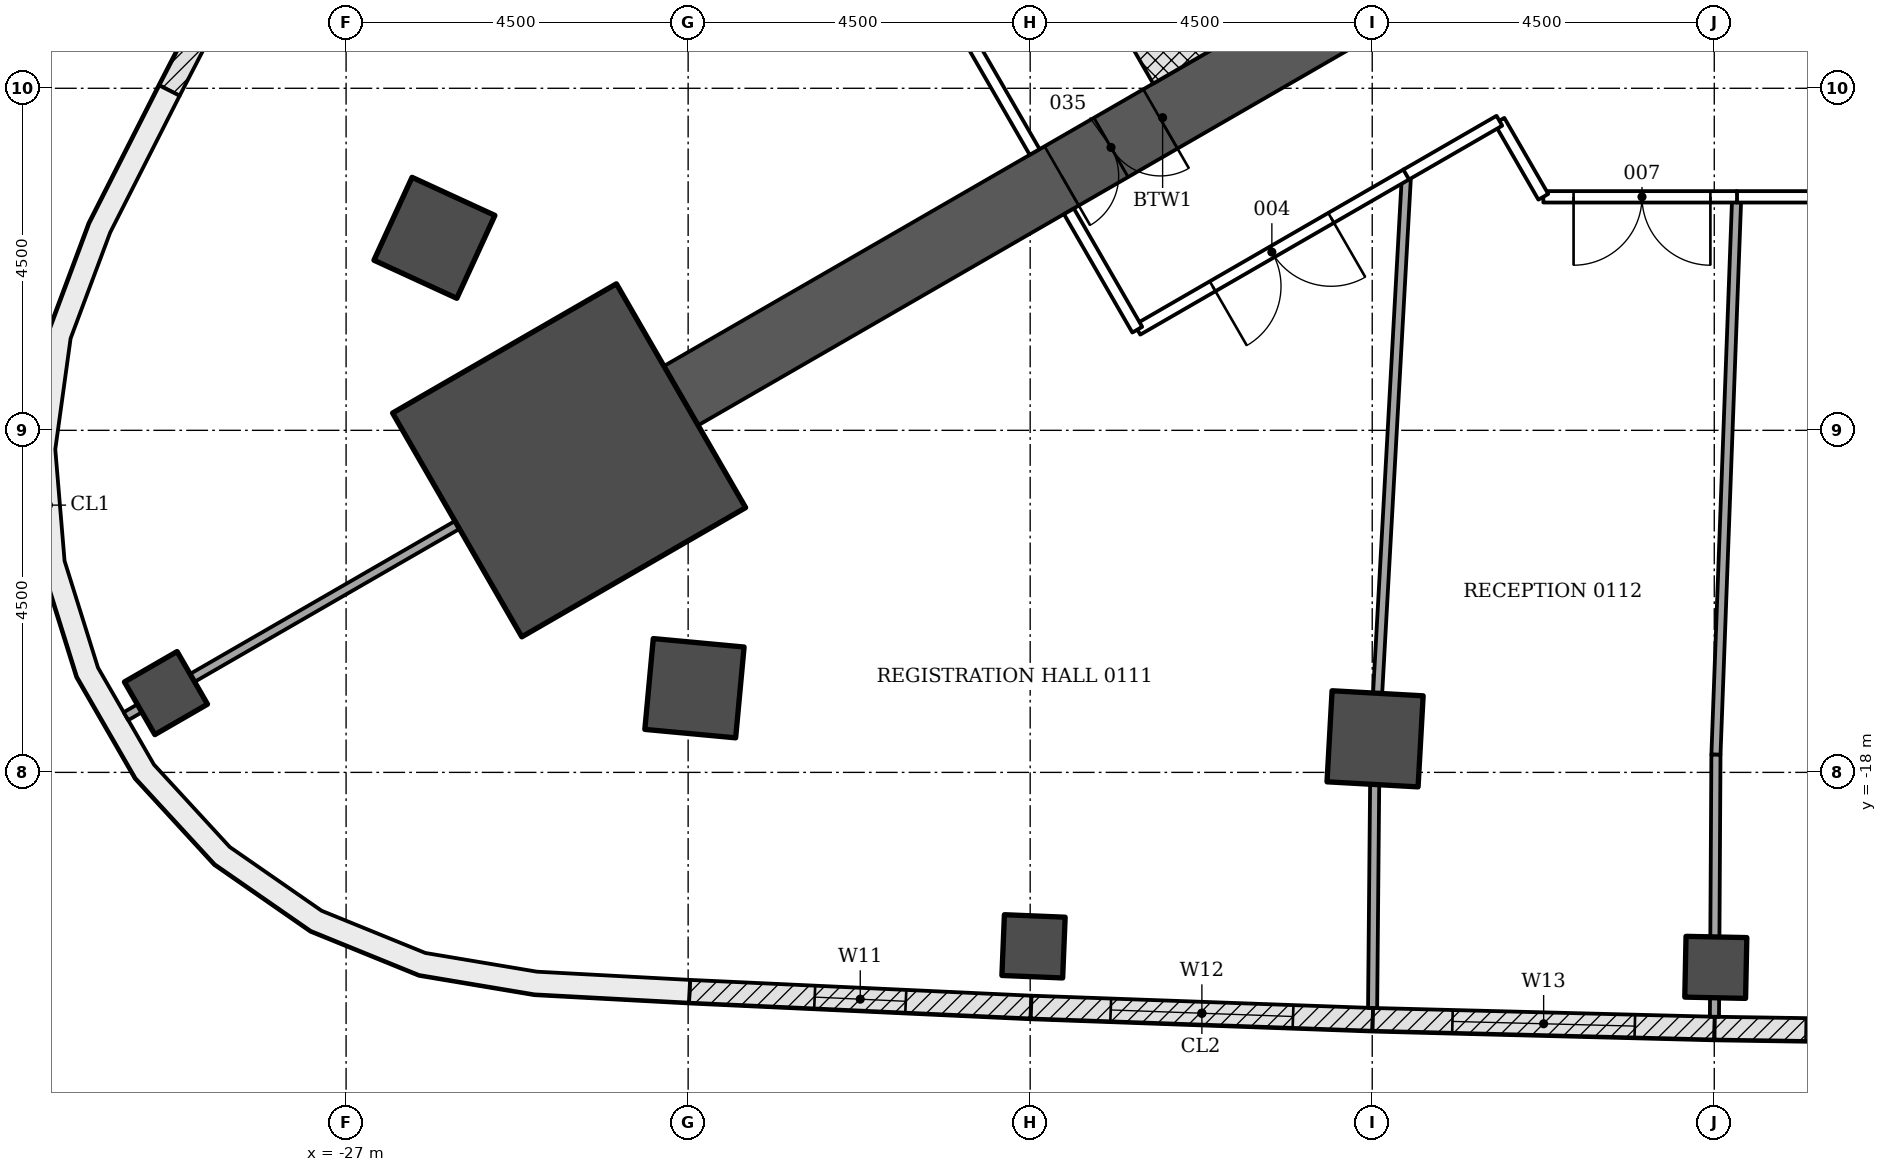
"""IFC4 building model, lengths in metres.
Left out: names, types, materials, properties, quantities, classifications, styles, units other than length and angle.
Written with IfcOpenShell. Run it as: python <this file> out.ifc"""

import sys

from ifc_helpers import new_model, si_unit, direction, frame, frame_2d, origin, origin_2d, place, context, subcontext, project, spatial, polyline, rectangle, outline, extrude, element, fill, save


model = new_model("IFC4")
c1 = context("Model", 3, precision=1e-05, world=origin(), true_north=direction((0.0, 1.0)))
c2 = subcontext(c1, "Body", "Model", "MODEL_VIEW")
j1 = project(units=[si_unit("LENGTHUNIT", "METRE"), si_unit("PLANEANGLEUNIT", "RADIAN")], contexts=[c1])
p1 = place(None, origin())
s1 = spatial("IfcSite", under=j1, at=p1, CompositionType="ELEMENT")
p2 = place(p1, origin())
s2 = spatial("IfcBuilding", under=s1, at=p2, CompositionType="ELEMENT")
p3 = place(p2, frame((0.0, 0.0, 6.0)))
s3 = spatial("IfcBuildingStorey", under=s2, at=p3, CompositionType="ELEMENT", Elevation=6.0)
for number, where, z_axis, x_axis in (
    (1, (-25.838, -10.967, -0.25), (0.0, 0.0, 1.0), (-0.909, 0.418, 0.0)),
    (2, (-22.417, -16.893, -0.25), (0.0, 0.0, 1.0), (-0.093, -0.996, 0.0)),
    (3, (-13.462, -17.558, -0.25), (0.0, 0.0, 1.0), (-0.056, -0.998, 0.0)),
):
    element("IfcColumn", number, at=place(p3, frame(where, z_axis=z_axis, x_axis=x_axis)), inside=s3, PredefinedType="COLUMN", context=c2, shape_type="SweptSolid", body=[
        extrude(rectangle(XDim=1.2, YDim=1.2, at=origin_2d()), origin(), (0.0, 0.0, 1.0), 4.5),
    ])
for number, where, z_axis, x_axis in (
    (4, (-29.37, -16.957, -0.25), (0.0, 0.0, 1.0), (-0.866, -0.5, 0.0)),
    (5, (-17.956, -20.288, -0.25), (0.0, 0.0, 1.0), (-0.041, -0.999, 0.0)),
    (6, (-8.98, -20.565, -0.25), (0.0, 0.0, 1.0), (-0.021, -1.0, 0.0)),
):
    element("IfcColumn", number, at=place(p3, frame(where, z_axis=z_axis, x_axis=x_axis)), inside=s3, PredefinedType="COLUMN", context=c2, shape_type="SweptSolid", body=[
        extrude(rectangle(XDim=0.8, YDim=0.8, at=origin_2d()), origin(), (0.0, 0.0, 1.0), 4.5),
    ])
p4 = place(p3, frame((-9.922, -5.728, -0.25), z_axis=(0.0, 0.0, 1.0), x_axis=(-0.866028046028, -0.499995423472, 0.0)))
e7 = element("IfcWall", 7, at=p4, inside=s3, PredefinedType="SHEAR", context=c2, shape_type="SweptSolid", body=[
    extrude(rectangle(XDim=14.633, YDim=0.9, at=frame_2d((7.316, 0.0))), origin(), (0.0, 0.0, 1.0), 4.5),
])
p5 = place(p4, frame((7.35, 0.0, 0.25)))
e8 = element("IfcOpeningElement", 8, at=p5, cuts=e7, PredefinedType="OPENING", context=c2, shape_type="SweptSolid", body=[
    extrude(rectangle(XDim=1.5, YDim=2.1, at=frame_2d((0.75, 1.05))), frame((0.0, 0.46, 0.0), z_axis=(0.0, -1.0, 0.0), x_axis=(1.0, 0.0, 0.0)), (0.0, 0.0, 1.0), 0.92),
])
p6 = place(p3, frame((-24.066, -13.895, -0.25), z_axis=(0.0, 0.0, 1.0), x_axis=(-0.866025403784, -0.5, 0.0)))
e9 = element("IfcColumn", 9, at=p6, inside=s3, PredefinedType="COLUMN", context=c2, shape_type="SweptSolid", body=[
    extrude(rectangle(XDim=3.4, YDim=3.4, at=origin_2d()), origin(), (0.0, 0.0, 1.0), 4.5),
])
p7 = place(p3, frame((-29.323, -9.029, 0.0), z_axis=(0.0, 0.0, 1.0), x_axis=(0.459443600121, 0.888206945654, 0.0)))
e10 = element("IfcWall", 10, at=p7, inside=s3, PredefinedType="NOTDEFINED", context=c2, shape_type="SweptSolid", body=[
    extrude(rectangle(XDim=4.496, YDim=0.3, at=frame_2d((2.248, 0.0))), origin(), (0.0, 0.0, 1.0), 4.25),
])
p8 = place(p7, frame((1.648, 0.0, 0.8)))
e11 = element("IfcOpeningElement", 11, at=p8, cuts=e10, PredefinedType="OPENING", context=c2, shape_type="SweptSolid", body=[
    extrude(rectangle(XDim=1.2, YDim=3.0, at=frame_2d((0.6, 1.5))), frame((0.0, 0.16, 0.0), z_axis=(0.0, -1.0, 0.0), x_axis=(1.0, 0.0, 0.0)), (0.0, 0.0, 1.0), 0.32),
])
p9 = place(p3, frame((-17.99, -21.088, 0.0), z_axis=(0.0, 0.0, 1.0), x_axis=(-0.998931717866, 0.046210637742, 0.0)))
e12 = element("IfcWall", 12, at=p9, inside=s3, PredefinedType="NOTDEFINED", context=c2, shape_type="SweptSolid", body=[
    extrude(rectangle(XDim=4.496, YDim=0.3, at=frame_2d((2.248, 0.0))), origin(), (0.0, 0.0, 1.0), 4.25),
])
p10 = place(p9, frame((1.648, 0.0, 0.8)))
e13 = element("IfcOpeningElement", 13, at=p10, cuts=e12, PredefinedType="OPENING", context=c2, shape_type="SweptSolid", body=[
    extrude(rectangle(XDim=1.2, YDim=3.0, at=frame_2d((0.6, 1.5))), frame((0.0, 0.16, 0.0), z_axis=(0.0, -1.0, 0.0), x_axis=(1.0, 0.0, 0.0)), (0.0, 0.0, 1.0), 0.32),
])
p11 = place(p3, frame((-13.494, -21.249, 0.0), z_axis=(0.0, 0.0, 1.0), x_axis=(-0.999355640029, 0.035892962294, 0.0)))
e14 = element("IfcWall", 14, at=p11, inside=s3, PredefinedType="NOTDEFINED", context=c2, shape_type="SweptSolid", body=[
    extrude(rectangle(XDim=4.496, YDim=0.3, at=frame_2d((2.248, 0.0))), origin(), (0.0, 0.0, 1.0), 4.25),
])
p12 = place(p11, frame((1.048, 0.0, 0.9)))
e15 = element("IfcOpeningElement", 15, at=p12, cuts=e14, PredefinedType="OPENING", context=c2, shape_type="SweptSolid", body=[
    extrude(rectangle(XDim=2.4, YDim=2.4, at=frame_2d((1.2, 1.2))), frame((0.0, 0.16, 0.0), z_axis=(0.0, -1.0, 0.0), x_axis=(1.0, 0.0, 0.0)), (0.0, 0.0, 1.0), 0.32),
])
p13 = place(p3, frame((-8.998, -21.365, 0.0), z_axis=(0.0, 0.0, 1.0), x_axis=(-0.999671466587, 0.025631209312, 0.0)))
e16 = element("IfcWall", 16, at=p13, inside=s3, PredefinedType="NOTDEFINED", context=c2, shape_type="SweptSolid", body=[
    extrude(rectangle(XDim=4.496, YDim=0.3, at=frame_2d((2.248, 0.0))), origin(), (0.0, 0.0, 1.0), 4.25),
])
p14 = place(p13, frame((1.048, 0.0, 0.9)))
e17 = element("IfcOpeningElement", 17, at=p14, cuts=e16, PredefinedType="OPENING", context=c2, shape_type="SweptSolid", body=[
    extrude(rectangle(XDim=2.4, YDim=2.4, at=frame_2d((1.2, 1.2))), frame((0.0, 0.16, 0.0), z_axis=(0.0, -1.0, 0.0), x_axis=(1.0, 0.0, 0.0)), (0.0, 0.0, 1.0), 0.32),
])
p15 = place(p3, frame((-4.5, -21.434, 0.0), z_axis=(0.0, 0.0, 1.0), x_axis=(-0.999881921814, 0.015366926462, 0.0)))
e18 = element("IfcWall", 18, at=p15, inside=s3, PredefinedType="NOTDEFINED", context=c2, shape_type="SweptSolid", body=[
    extrude(rectangle(XDim=4.496, YDim=0.3, at=frame_2d((2.248, 0.0))), origin(), (0.0, 0.0, 1.0), 4.25),
])
p16 = place(p15, frame((1.198, 0.0, 0.8)))
e19 = element("IfcOpeningElement", 19, at=p16, cuts=e18, PredefinedType="OPENING", context=c2, shape_type="SweptSolid", body=[
    extrude(rectangle(XDim=2.1, YDim=3.0, at=frame_2d((1.05, 1.5))), frame((0.0, 0.16, 0.0), z_axis=(0.0, -1.0, 0.0), x_axis=(1.0, 0.0, 0.0)), (0.0, 0.0, 1.0), 0.32),
])
p17 = place(p3, origin())
e20 = element("IfcWall", 20, at=p17, inside=s3, PredefinedType="NOTDEFINED", context=c2, shape_type="SweptSolid", body=[
    extrude(outline(polyline([(-29.457, -8.962), (-30.379, -10.776), (-30.917, -12.218), (-31.128, -13.742), (-31.0, -15.276), (-30.54, -16.744), (-29.771, -18.077), (-28.729, -19.209), (-27.465, -20.086), (-26.04, -20.666), (-24.522, -20.921), (-22.49, -21.03), (-22.474, -20.73), (-24.489, -20.622), (-25.957, -20.376), (-27.321, -19.821), (-28.531, -18.981), (-29.528, -17.898), (-30.264, -16.623), (-30.704, -15.218), (-30.826, -13.75), (-30.625, -12.292), (-30.104, -10.897), (-29.19, -9.098), (-29.457, -8.962)])), origin(), (0.0, 0.0, 1.0), 4.25),
])
p18 = place(p3, frame((-10.43, -4.847, -0.25), z_axis=(0.0, 0.0, 1.0), x_axis=(-0.866018442252, -0.500012057535, 0.0)))
e21 = element("IfcWall", 21, at=p18, inside=s3, PredefinedType="SHEAR", context=c2, shape_type="SweptSolid", body=[
    extrude(rectangle(XDim=7.2, YDim=1.136, at=frame_2d((3.6, 0.0))), origin(), (0.0, 0.0, 1.0), 4.5),
])
p19 = place(p3, frame((-13.495, -21.099, 0.0), z_axis=(0.0, 0.0, 1.0), x_axis=(0.009216581037, 0.999957526415, 0.0)))
e22 = element("IfcWall", 22, at=p19, inside=s3, PredefinedType="PARTITIONING", context=c2, shape_type="SweptSolid", body=[
    extrude(rectangle(XDim=2.94, YDim=0.12, at=frame_2d((1.47, 0.0))), origin(), (0.0, 0.0, 1.0), 3.633),
])
p20 = place(p3, frame((-13.429, -16.96, 0.0), z_axis=(0.0, 0.0, 1.0), x_axis=(0.055551088657, 0.998455846069, 0.0)))
e23 = element("IfcWall", 23, at=p20, inside=s3, PredefinedType="PARTITIONING", context=c2, shape_type="SweptSolid", body=[
    extrude(rectangle(XDim=6.838, YDim=0.12, at=frame_2d((3.419, 0.0))), origin(), (0.0, 0.0, 1.0), 3.638),
])
p21 = place(p3, frame((-13.045, -10.13, 0.0), z_axis=(0.0, 0.0, 1.0), x_axis=(-0.866035577775, -0.499982377718, 0.0)))
e24 = element("IfcWall", 24, at=p21, inside=s3, PredefinedType="PARTITIONING", context=c2, shape_type="SweptSolid", body=[
    extrude(rectangle(XDim=4.093, YDim=0.15, at=frame_2d((2.046, 0.0))), origin(), (0.0, 0.0, 1.0), 3.638),
])
p22 = place(p21, frame((1.15, 0.0, 0.0)))
e25 = element("IfcOpeningElement", 25, at=p22, cuts=e24, PredefinedType="OPENING", context=c2, shape_type="SweptSolid", body=[
    extrude(rectangle(XDim=1.8, YDim=2.1, at=frame_2d((0.9, 1.05))), frame((0.0, 0.085, 0.0), z_axis=(0.0, -1.0, 0.0), x_axis=(1.0, 0.0, 0.0)), (0.0, 0.0, 1.0), 0.17),
])
p23 = place(p3, frame((-16.591, -12.176, 0.0), z_axis=(0.0, 0.0, 1.0), x_axis=(-0.499965372359, 0.866045395139, 0.0)))
e26 = element("IfcWall", 26, at=p23, inside=s3, PredefinedType="PARTITIONING", context=c2, shape_type="SweptSolid", body=[
    extrude(rectangle(XDim=1.798, YDim=0.15, at=frame_2d((0.899, 0.0))), origin(), (0.0, 0.0, 1.0), 3.638),
])
p24 = place(p3, frame((-29.716, -17.157, 0.0), z_axis=(0.0, 0.0, 1.0), x_axis=(-0.865774595023, -0.500434162116, 0.0)))
e27 = element("IfcWall", 27, at=p24, inside=s3, PredefinedType="PARTITIONING", context=c2, shape_type="SweptSolid", body=[
    extrude(rectangle(XDim=0.208, YDim=0.12, at=frame_2d((0.104, 0.0))), origin(), (0.0, 0.0, 1.0), 4.25),
])
p25 = place(p3, frame((-25.538, -14.745, 0.0), z_axis=(0.0, 0.0, 1.0), x_axis=(-0.866027971625, -0.499995552344, 0.0)))
e28 = element("IfcWall", 28, at=p25, inside=s3, PredefinedType="PARTITIONING", context=c2, shape_type="SweptSolid", body=[
    extrude(rectangle(XDim=4.024, YDim=0.12, at=frame_2d((2.012, 0.0))), origin(), (0.0, 0.0, 1.0), 3.717),
])
p26 = place(p3, frame((-8.996, -20.965, 0.0), z_axis=(0.0, 0.0, 1.0), x_axis=(-0.007812261592, -0.999969483819, 0.0)))
e29 = element("IfcWall", 29, at=p26, inside=s3, PredefinedType="PARTITIONING", context=c2, shape_type="SweptSolid", body=[
    extrude(rectangle(XDim=0.25, YDim=0.12, at=frame_2d((0.125, 0.0))), origin(), (0.0, 0.0, 1.0), 4.25),
])
p27 = place(p3, frame((-8.705, -10.429, 0.0), z_axis=(0.0, 0.0, 1.0), x_axis=(-0.037170289837, -0.999308945999, 0.0)))
e30 = element("IfcWall", 30, at=p27, inside=s3, PredefinedType="PARTITIONING", context=c2, shape_type="SweptSolid", body=[
    extrude(rectangle(XDim=7.343, YDim=0.12, at=frame_2d((3.672, 0.0))), origin(), (0.0, 0.0, 1.0), 3.638),
])
p28 = place(p3, frame((-8.978, -17.767, 0.0), z_axis=(0.0, 0.0, 1.0), x_axis=(-0.005803200997, -0.999983161287, 0.0)))
e31 = element("IfcWall", 31, at=p28, inside=s3, PredefinedType="PARTITIONING", context=c2, shape_type="SweptSolid", body=[
    extrude(rectangle(XDim=2.398, YDim=0.12, at=frame_2d((1.199, 0.0))), origin(), (0.0, 0.0, 1.0), 3.638),
])
p29 = place(p3, frame((0.004, -10.428, 0.0), z_axis=(0.0, 0.0, 1.0), x_axis=(-1.0, 0.0, 0.0)))
e32 = element("IfcWall", 32, at=p29, inside=s3, PredefinedType="PARTITIONING", context=c2, shape_type="SweptSolid", body=[
    extrude(rectangle(XDim=8.713, YDim=0.15, at=frame_2d((4.356, 0.0))), origin(), (0.0, 0.0, 1.0), 3.638),
])
p30 = place(p29, frame((3.45, 0.0, 0.0)))
e33 = element("IfcOpeningElement", 33, at=p30, cuts=e32, PredefinedType="OPENING", context=c2, shape_type="SweptSolid", body=[
    extrude(rectangle(XDim=1.8, YDim=2.1, at=frame_2d((0.9, 1.05))), frame((0.0, 0.085, 0.0), z_axis=(0.0, -1.0, 0.0), x_axis=(1.0, 0.0, 0.0)), (0.0, 0.0, 1.0), 0.17),
])
p31 = place(p3, frame((-8.701, -10.428, 0.0), z_axis=(0.0, 0.0, 1.0), x_axis=(-1.0, 0.0, 0.0)))
e34 = element("IfcWall", 34, at=p31, inside=s3, PredefinedType="PARTITIONING", context=c2, shape_type="SweptSolid", body=[
    extrude(rectangle(XDim=2.548, YDim=0.15, at=frame_2d((1.274, 0.0))), origin(), (0.0, 0.0, 1.0), 3.638),
])
p32 = place(p31, frame((0.35, 0.0, 0.0)))
e35 = element("IfcOpeningElement", 35, at=p32, cuts=e34, PredefinedType="OPENING", context=c2, shape_type="SweptSolid", body=[
    extrude(rectangle(XDim=1.8, YDim=2.1, at=frame_2d((0.9, 1.05))), frame((0.0, 0.085, 0.0), z_axis=(0.0, -1.0, 0.0), x_axis=(1.0, 0.0, 0.0)), (0.0, 0.0, 1.0), 0.17),
])
p33 = place(p3, frame((-11.249, -10.428, 0.0), z_axis=(0.0, 0.0, 1.0), x_axis=(-0.499978438088, 0.866037852202, 0.0)))
e36 = element("IfcWall", 36, at=p33, inside=s3, PredefinedType="PARTITIONING", context=c2, shape_type="SweptSolid", body=[
    extrude(rectangle(XDim=1.156, YDim=0.15, at=frame_2d((0.578, 0.0))), origin(), (0.0, 0.0, 1.0), 4.25),
])
p34 = place(p3, frame((-11.827, -9.427, 0.0), z_axis=(0.0, 0.0, 1.0), x_axis=(-0.865984561414, -0.500070734389, 0.0)))
e37 = element("IfcWall", 37, at=p34, inside=s3, PredefinedType="PARTITIONING", context=c2, shape_type="SweptSolid", body=[
    extrude(rectangle(XDim=1.416, YDim=0.15, at=frame_2d((0.708, 0.0))), origin(), (0.0, 0.0, 1.0), 3.638),
])
p35 = place(p3, frame((-17.941, -9.838, 0.0), z_axis=(0.0, 0.0, 1.0), x_axis=(-0.500048140185, 0.865997608252, 0.0)))
e38 = element("IfcWall", 38, at=p35, inside=s3, PredefinedType="PARTITIONING", context=c2, shape_type="SweptSolid", body=[
    extrude(rectangle(XDim=6.683, YDim=0.15, at=frame_2d((3.342, 0.0))), origin(), (0.0, 0.0, 1.0), 3.638),
])
p36 = place(p35, frame((2.45, 0.0, 0.0)))
e39 = element("IfcOpeningElement", 39, at=p36, cuts=e38, PredefinedType="OPENING", context=c2, shape_type="SweptSolid", body=[
    extrude(rectangle(XDim=1.8, YDim=2.1, at=frame_2d((0.9, 1.05))), frame((0.0, 0.085, 0.0), z_axis=(0.0, -1.0, 0.0), x_axis=(1.0, 0.0, 0.0)), (0.0, 0.0, 1.0), 0.17),
])
p37 = place(p10, origin())
e40 = element("IfcWindow", 40, at=p37, inside=s3, PartitioningType="SINGLE_PANEL", PredefinedType="WINDOW", context=c2, shape_type="SweptSolid", body=[
    extrude(rectangle(XDim=1.2, YDim=3.0, at=frame_2d((0.6, 1.5))), frame((0.0, 0.03, 0.0), z_axis=(0.0, -1.0, 0.0), x_axis=(1.0, 0.0, 0.0)), (0.0, 0.0, 1.0), 0.06),
])
fill(e13, e40)
p38 = place(p12, origin())
e41 = element("IfcWindow", 41, at=p38, inside=s3, PartitioningType="DOUBLE_PANEL_VERTICAL", PredefinedType="WINDOW", context=c2, shape_type="SweptSolid", body=[
    extrude(rectangle(XDim=2.4, YDim=2.4, at=frame_2d((1.2, 1.2))), frame((0.0, 0.03, 0.0), z_axis=(0.0, -1.0, 0.0), x_axis=(1.0, 0.0, 0.0)), (0.0, 0.0, 1.0), 0.06),
])
fill(e15, e41)
p39 = place(p14, origin())
e42 = element("IfcWindow", 42, at=p39, inside=s3, PartitioningType="DOUBLE_PANEL_VERTICAL", PredefinedType="WINDOW", context=c2, shape_type="SweptSolid", body=[
    extrude(rectangle(XDim=2.4, YDim=2.4, at=frame_2d((1.2, 1.2))), frame((0.0, 0.03, 0.0), z_axis=(0.0, -1.0, 0.0), x_axis=(1.0, 0.0, 0.0)), (0.0, 0.0, 1.0), 0.06),
])
fill(e17, e42)
p40 = place(p16, origin())
e43 = element("IfcWindow", 43, at=p40, inside=s3, PartitioningType="DOUBLE_PANEL_HORIZONTAL", PredefinedType="WINDOW", context=c2, shape_type="SweptSolid", body=[
    extrude(rectangle(XDim=2.1, YDim=3.0, at=frame_2d((1.05, 1.5))), frame((0.0, 0.03, 0.0), z_axis=(0.0, -1.0, 0.0), x_axis=(1.0, 0.0, 0.0)), (0.0, 0.0, 1.0), 0.06),
])
fill(e19, e43)
p41 = place(p22, origin())
e44 = element("IfcDoor", 44, at=p41, inside=s3, OperationType="DOUBLE_DOOR_SINGLE_SWING", PredefinedType="DOOR", context=c2, shape_type="SweptSolid", body=[
    extrude(rectangle(XDim=1.8, YDim=2.1, at=frame_2d((0.9, 1.05))), frame((0.0, 0.025, 0.0), z_axis=(0.0, -1.0, 0.0), x_axis=(1.0, 0.0, 0.0)), (0.0, 0.0, 1.0), 0.05),
])
fill(e25, e44)
p42 = place(p32, origin())
e45 = element("IfcDoor", 45, at=p42, inside=s3, OperationType="DOUBLE_DOOR_SINGLE_SWING", PredefinedType="DOOR", context=c2, shape_type="SweptSolid", body=[
    extrude(rectangle(XDim=1.8, YDim=2.1, at=frame_2d((0.9, 1.05))), frame((0.0, 0.025, 0.0), z_axis=(0.0, -1.0, 0.0), x_axis=(1.0, 0.0, 0.0)), (0.0, 0.0, 1.0), 0.05),
])
fill(e35, e45)
p43 = place(p5, origin())
e46 = element("IfcDoor", 46, at=p43, inside=s3, OperationType="DOUBLE_DOOR_SINGLE_SWING", PredefinedType="DOOR", context=c2, shape_type="SweptSolid", body=[
    extrude(rectangle(XDim=1.5, YDim=2.1, at=frame_2d((0.75, 1.05))), frame((0.0, 0.025, 0.0), z_axis=(0.0, -1.0, 0.0), x_axis=(1.0, 0.0, 0.0)), (0.0, 0.0, 1.0), 0.05),
])
fill(e8, e46)
save(model, sys.argv[1])
